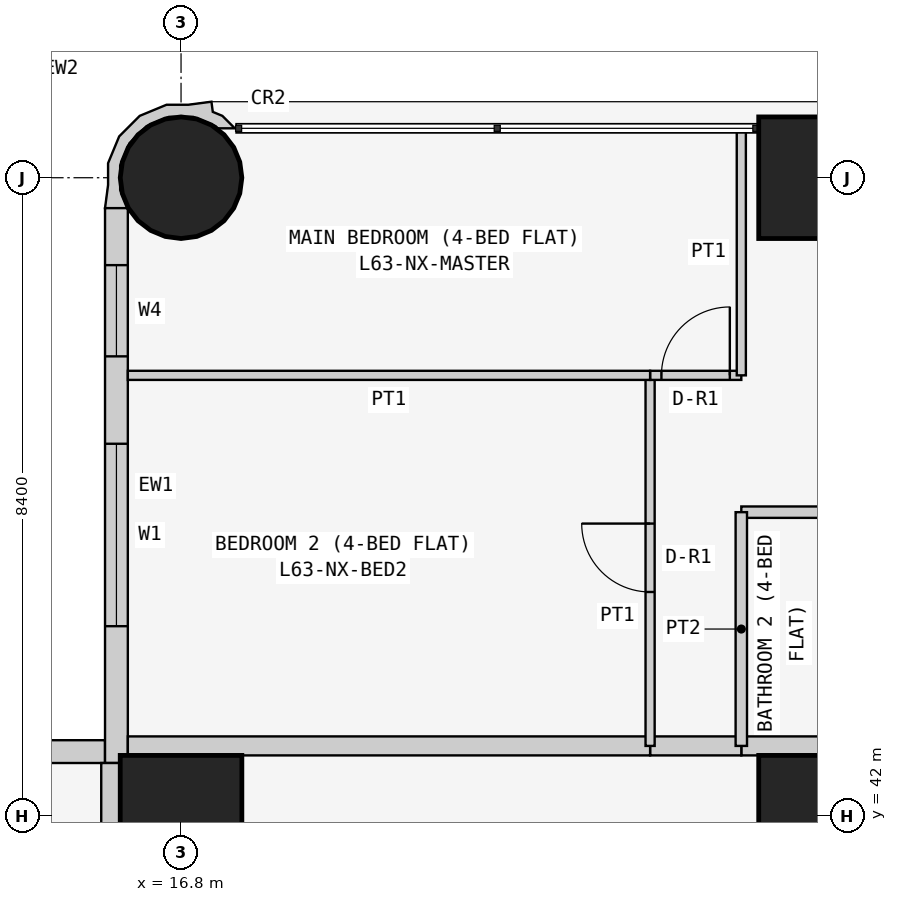
"""IFC4 building model, lengths in metres.
Left out: names, types, materials, properties, quantities, classifications, styles, units other than length and angle.
Written with IfcOpenShell. Run it as: python <this file> out.ifc"""

import sys

from ifc_helpers import new_model, si_unit, direction, frame, frame_2d, origin, origin_2d, place, context, subcontext, project, spatial, polyline, rectangle, circle, outline, extrude, element, fill, save


model = new_model("IFC4")
c1 = context("Model", 3, precision=1e-05, world=origin(), true_north=direction((0.0, 1.0)))
c2 = subcontext(c1, "Body", "Model", "MODEL_VIEW")
j1 = project(units=[si_unit("LENGTHUNIT", "METRE"), si_unit("PLANEANGLEUNIT", "RADIAN")], contexts=[c1])
p1 = place(None, origin())
s1 = spatial("IfcSite", under=j1, at=p1, CompositionType="ELEMENT")
p2 = place(p1, origin())
s2 = spatial("IfcBuilding", under=s1, at=p2, CompositionType="ELEMENT")
p3 = place(p2, frame((0.0, 0.0, 240.9)))
s3 = spatial("IfcBuildingStorey", under=s2, at=p3, CompositionType="ELEMENT", Elevation=240.9)
p4 = place(p3, frame((16.8, 42.0, 0.0), z_axis=(0.0, 0.0, 1.0), x_axis=(1.0, 0.0, 0.0)))
e1 = element("IfcColumn", 1, at=p4, inside=s3, PredefinedType="COLUMN", context=c2, shape_type="SweptSolid", body=[
    extrude(rectangle(XDim=1.6, YDim=1.6, at=origin_2d()), origin(), (0.0, 0.0, 1.0), 3.6),
])
p5 = place(p3, frame((16.8, 50.4, 0.0), z_axis=(0.0, 0.0, 1.0), x_axis=(1.0, 0.0, 0.0)))
e2 = element("IfcColumn", 2, at=p5, inside=s3, PredefinedType="COLUMN", context=c2, shape_type="SweptSolid", body=[
    extrude(circle(Radius=0.8, at=origin_2d()), origin(), (0.0, 0.0, 1.0), 3.6),
])
for number, where, z_axis, x_axis in (
    (3, (25.2, 42.0, 0.0), (0.0, 0.0, 1.0), (1.0, 0.0, 0.0)),
    (4, (25.2, 50.4, 0.0), (0.0, 0.0, 1.0), (1.0, 0.0, 0.0)),
):
    element("IfcColumn", number, at=place(p3, frame(where, z_axis=z_axis, x_axis=x_axis)), inside=s3, PredefinedType="COLUMN", context=c2, shape_type="SweptSolid", body=[
        extrude(rectangle(XDim=1.6, YDim=1.6, at=origin_2d()), origin(), (0.0, 0.0, 1.0), 3.6),
    ])
p6 = place(p3, frame((15.8, 42.85, 0.0), z_axis=(0.0, 0.0, 1.0), x_axis=(-1.0, 0.0, 0.0)))
e5 = element("IfcWall", 5, at=p6, inside=s3, PredefinedType="SOLIDWALL", context=c2, shape_type="SweptSolid", body=[
    extrude(rectangle(XDim=15.4, YDim=0.3, at=frame_2d((7.7, 0.0))), origin(), (0.0, 0.0, 1.0), 3.45),
])
p7 = place(p6, frame((1.2, 0.0, 0.9)))
e6 = element("IfcOpeningElement", 6, at=p7, cuts=e5, PredefinedType="OPENING", context=c2, shape_type="SweptSolid", body=[
    extrude(rectangle(XDim=1.8, YDim=1.5, at=frame_2d((0.9, 0.75))), frame((0.0, 0.16, 0.0), z_axis=(0.0, -1.0, 0.0), x_axis=(1.0, 0.0, 0.0)), (0.0, 0.0, 1.0), 0.32),
])
p8 = place(p6, frame((4.95, 0.0, 1.5)))
e7 = element("IfcOpeningElement", 7, at=p8, cuts=e5, PredefinedType="OPENING", context=c2, shape_type="SweptSolid", body=[
    extrude(rectangle(XDim=0.9, YDim=0.7, at=frame_2d((0.45, 0.35))), frame((0.0, 0.16, 0.0), z_axis=(0.0, -1.0, 0.0), x_axis=(1.0, 0.0, 0.0)), (0.0, 0.0, 1.0), 0.32),
])
p9 = place(p6, frame((8.5, 0.0, 0.9)))
e8 = element("IfcOpeningElement", 8, at=p9, cuts=e5, PredefinedType="OPENING", context=c2, shape_type="SweptSolid", body=[
    extrude(rectangle(XDim=1.8, YDim=1.5, at=frame_2d((0.9, 0.75))), frame((0.0, 0.16, 0.0), z_axis=(0.0, -1.0, 0.0), x_axis=(1.0, 0.0, 0.0)), (0.0, 0.0, 1.0), 0.32),
])
p10 = place(p6, frame((12.5, 0.0, 0.0)))
e9 = element("IfcOpeningElement", 9, at=p10, cuts=e5, PredefinedType="OPENING", context=c2, shape_type="SweptSolid", body=[
    extrude(rectangle(XDim=0.9, YDim=2.4, at=frame_2d((0.45, 1.2))), frame((0.0, 0.16, 0.0), z_axis=(0.0, -1.0, 0.0), x_axis=(1.0, 0.0, 0.0)), (0.0, 0.0, 1.0), 0.32),
])
p11 = place(p6, frame((13.5, 0.0, 0.9)))
e10 = element("IfcOpeningElement", 10, at=p11, cuts=e5, PredefinedType="OPENING", context=c2, shape_type="SweptSolid", body=[
    extrude(rectangle(XDim=1.2, YDim=1.5, at=frame_2d((0.6, 0.75))), frame((0.0, 0.16, 0.0), z_axis=(0.0, -1.0, 0.0), x_axis=(1.0, 0.0, 0.0)), (0.0, 0.0, 1.0), 0.32),
])
p12 = place(p3, frame((15.95, 50.0, 0.0), z_axis=(0.0, 0.0, 1.0), x_axis=(0.0, -1.0, 0.0)))
e11 = element("IfcWall", 11, at=p12, inside=s3, PredefinedType="SOLIDWALL", context=c2, shape_type="SweptSolid", body=[
    extrude(rectangle(XDim=7.3, YDim=0.3, at=frame_2d((3.65, 0.0))), origin(), (0.0, 0.0, 1.0), 3.45),
])
p13 = place(p12, frame((3.1, 0.0, 0.9)))
e12 = element("IfcOpeningElement", 12, at=p13, cuts=e11, PredefinedType="OPENING", context=c2, shape_type="SweptSolid", body=[
    extrude(rectangle(XDim=2.4, YDim=1.5, at=frame_2d((1.2, 0.75))), frame((0.0, 0.16, 0.0), z_axis=(0.0, -1.0, 0.0), x_axis=(1.0, 0.0, 0.0)), (0.0, 0.0, 1.0), 0.32),
])
p14 = place(p12, frame((0.75, 0.0, 0.9)))
e13 = element("IfcOpeningElement", 13, at=p14, cuts=e11, PredefinedType="OPENING", context=c2, shape_type="SweptSolid", body=[
    extrude(rectangle(XDim=1.2, YDim=1.5, at=frame_2d((0.6, 0.75))), frame((0.0, 0.16, 0.0), z_axis=(0.0, -1.0, 0.0), x_axis=(1.0, 0.0, 0.0)), (0.0, 0.0, 1.0), 0.32),
])
p15 = place(p3, frame((17.448, 50.995, 0.0), z_axis=(0.0, 0.0, 1.0), x_axis=(-0.343276641956, 0.93923434088, 0.0)))
e14 = element("IfcWall", 14, at=p15, inside=s3, PredefinedType="SOLIDWALL", context=c2, shape_type="SweptSolid", body=[
    extrude(outline(polyline([(0.241, 0.023), (0.333, 0.124), (0.465, 0.094), (0.532, 0.393), (0.631, 0.663), (0.614, 1.045), (0.454, 1.391), (0.172, 1.649), (-0.098, 1.748), (-0.369, 1.89), (-0.509, 1.621), (-0.491, 1.615), (-0.479, 1.609), (-0.211, 1.62), (0.088, 1.511), (0.323, 1.295), (0.457, 1.006), (0.47, 0.688), (0.361, 0.389), (0.145, 0.154), (0.108, 0.137), (0.031, -0.075), (0.241, 0.023)])), origin(), (0.0, 0.0, 1.0), 3.45),
])
p16 = place(p3, frame((24.171, 42.925, 0.0), z_axis=(0.0, 0.0, 1.0), x_axis=(1.0, 0.0, 0.0)))
e15 = element("IfcWall", 15, at=p16, inside=s3, PredefinedType="PARTITIONING", context=c2, shape_type="SweptSolid", body=[
    extrude(rectangle(XDim=2.629, YDim=0.25, at=frame_2d((1.314, 0.0))), origin(), (0.0, 0.0, 1.0), 3.45),
])
p17 = place(p3, frame((22.971, 42.925, 0.0), z_axis=(0.0, 0.0, 1.0), x_axis=(1.0, 0.0, 0.0)))
e16 = element("IfcWall", 16, at=p17, inside=s3, PredefinedType="PARTITIONING", context=c2, shape_type="SweptSolid", body=[
    extrude(rectangle(XDim=1.2, YDim=0.25, at=frame_2d((0.6, 0.0))), origin(), (0.0, 0.0, 1.0), 3.45),
])
p18 = place(p3, frame((16.1, 42.925, 0.0), z_axis=(0.0, 0.0, 1.0), x_axis=(1.0, 0.0, 0.0)))
e17 = element("IfcWall", 17, at=p18, inside=s3, PredefinedType="PARTITIONING", context=c2, shape_type="SweptSolid", body=[
    extrude(rectangle(XDim=6.871, YDim=0.25, at=frame_2d((3.436, 0.0))), origin(), (0.0, 0.0, 1.0), 3.45),
])
p19 = place(p3, frame((15.875, 36.229, 0.0), z_axis=(0.0, 0.0, 1.0), x_axis=(0.0, 1.0, 0.0)))
e18 = element("IfcWall", 18, at=p19, inside=s3, PredefinedType="PARTITIONING", context=c2, shape_type="SweptSolid", body=[
    extrude(rectangle(XDim=6.471, YDim=0.25, at=frame_2d((3.235, 0.0))), origin(), (0.0, 0.0, 1.0), 3.45),
])
p20 = place(p3, frame((26.8, 46.0, 0.0), z_axis=(0.0, 0.0, 1.0), x_axis=(-1.0, 0.0, 0.0)))
e19 = element("IfcWall", 19, at=p20, inside=s3, PredefinedType="PARTITIONING", context=c2, shape_type="SweptSolid", body=[
    extrude(rectangle(XDim=2.629, YDim=0.15, at=frame_2d((1.314, 0.0))), origin(), (0.0, 0.0, 1.0), 3.45),
])
p21 = place(p3, frame((24.171, 46.0, 0.0), z_axis=(0.0, 0.0, 1.0), x_axis=(0.0, -1.0, 0.0)))
e20 = element("IfcWall", 20, at=p21, inside=s3, PredefinedType="PARTITIONING", context=c2, shape_type="SweptSolid", body=[
    extrude(rectangle(XDim=3.075, YDim=0.15, at=frame_2d((1.538, 0.0))), origin(), (0.0, 0.0, 1.0), 3.45),
])
p22 = place(p3, frame((22.971, 42.925, 0.0), z_axis=(0.0, 0.0, 1.0), x_axis=(0.0, 1.0, 0.0)))
e21 = element("IfcWall", 21, at=p22, inside=s3, PredefinedType="PARTITIONING", context=c2, shape_type="SweptSolid", body=[
    extrude(rectangle(XDim=4.875, YDim=0.12, at=frame_2d((2.438, 0.0))), origin(), (0.0, 0.0, 1.0), 3.45),
])
p23 = place(p22, frame((2.025, 0.0, 0.0)))
e22 = element("IfcOpeningElement", 22, at=p23, cuts=e21, PredefinedType="OPENING", context=c2, shape_type="SweptSolid", body=[
    extrude(rectangle(XDim=0.9, YDim=2.1, at=frame_2d((0.45, 1.05))), frame((0.0, 0.07, 0.0), z_axis=(0.0, -1.0, 0.0), x_axis=(1.0, 0.0, 0.0)), (0.0, 0.0, 1.0), 0.14),
])
p24 = place(p3, frame((22.971, 47.8, 0.0), z_axis=(0.0, 0.0, 1.0), x_axis=(1.0, 0.0, 0.0)))
e23 = element("IfcWall", 23, at=p24, inside=s3, PredefinedType="PARTITIONING", context=c2, shape_type="SweptSolid", body=[
    extrude(rectangle(XDim=1.2, YDim=0.12, at=frame_2d((0.6, 0.0))), origin(), (0.0, 0.0, 1.0), 3.45),
])
p25 = place(p24, frame((0.149, 0.0, 0.0)))
e24 = element("IfcOpeningElement", 24, at=p25, cuts=e23, PredefinedType="OPENING", context=c2, shape_type="SweptSolid", body=[
    extrude(rectangle(XDim=0.9, YDim=2.1, at=frame_2d((0.45, 1.05))), frame((0.0, 0.07, 0.0), z_axis=(0.0, -1.0, 0.0), x_axis=(1.0, 0.0, 0.0)), (0.0, 0.0, 1.0), 0.14),
])
p26 = place(p3, frame((24.171, 47.8, 0.0), z_axis=(0.0, 0.0, 1.0), x_axis=(0.0, 1.0, 0.0)))
e25 = element("IfcWall", 25, at=p26, inside=s3, PredefinedType="PARTITIONING", context=c2, shape_type="SweptSolid", body=[
    extrude(rectangle(XDim=3.25, YDim=0.12, at=frame_2d((1.625, 0.0))), origin(), (0.0, 0.0, 1.0), 3.45),
])
p27 = place(p3, frame((22.971, 47.8, 0.0), z_axis=(0.0, 0.0, 1.0), x_axis=(-1.0, 0.0, 0.0)))
e26 = element("IfcWall", 26, at=p27, inside=s3, PredefinedType="PARTITIONING", context=c2, shape_type="SweptSolid", body=[
    extrude(rectangle(XDim=6.871, YDim=0.12, at=frame_2d((3.436, 0.0))), origin(), (0.0, 0.0, 1.0), 3.45),
])
p28 = place(p13, origin())
e27 = element("IfcWindow", 27, at=p28, inside=s3, PartitioningType="SINGLE_PANEL", PredefinedType="WINDOW", context=c2, shape_type="SweptSolid", body=[
    extrude(rectangle(XDim=2.4, YDim=1.5, at=frame_2d((1.2, 0.75))), frame((0.0, 0.03, 0.0), z_axis=(0.0, -1.0, 0.0), x_axis=(1.0, 0.0, 0.0)), (0.0, 0.0, 1.0), 0.06),
])
fill(e12, e27)
p29 = place(p14, origin())
e28 = element("IfcWindow", 28, at=p29, inside=s3, PartitioningType="SINGLE_PANEL", PredefinedType="WINDOW", context=c2, shape_type="SweptSolid", body=[
    extrude(rectangle(XDim=1.2, YDim=1.5, at=frame_2d((0.6, 0.75))), frame((0.0, 0.03, 0.0), z_axis=(0.0, -1.0, 0.0), x_axis=(1.0, 0.0, 0.0)), (0.0, 0.0, 1.0), 0.06),
])
fill(e13, e28)
p30 = place(p23, origin())
e29 = element("IfcDoor", 29, at=p30, inside=s3, OperationType="SINGLE_SWING_RIGHT", PredefinedType="DOOR", context=c2, shape_type="SweptSolid", body=[
    extrude(rectangle(XDim=0.9, YDim=2.1, at=frame_2d((0.45, 1.05))), frame((0.0, 0.025, 0.0), z_axis=(0.0, -1.0, 0.0), x_axis=(1.0, 0.0, 0.0)), (0.0, 0.0, 1.0), 0.05),
])
fill(e22, e29)
p31 = place(p25, origin())
e30 = element("IfcDoor", 30, at=p31, inside=s3, OperationType="SINGLE_SWING_RIGHT", PredefinedType="DOOR", context=c2, shape_type="SweptSolid", body=[
    extrude(rectangle(XDim=0.9, YDim=2.1, at=frame_2d((0.45, 1.05))), frame((0.0, 0.025, 0.0), z_axis=(0.0, -1.0, 0.0), x_axis=(1.0, 0.0, 0.0)), (0.0, 0.0, 1.0), 0.05),
])
fill(e24, e30)
save(model, sys.argv[1])
